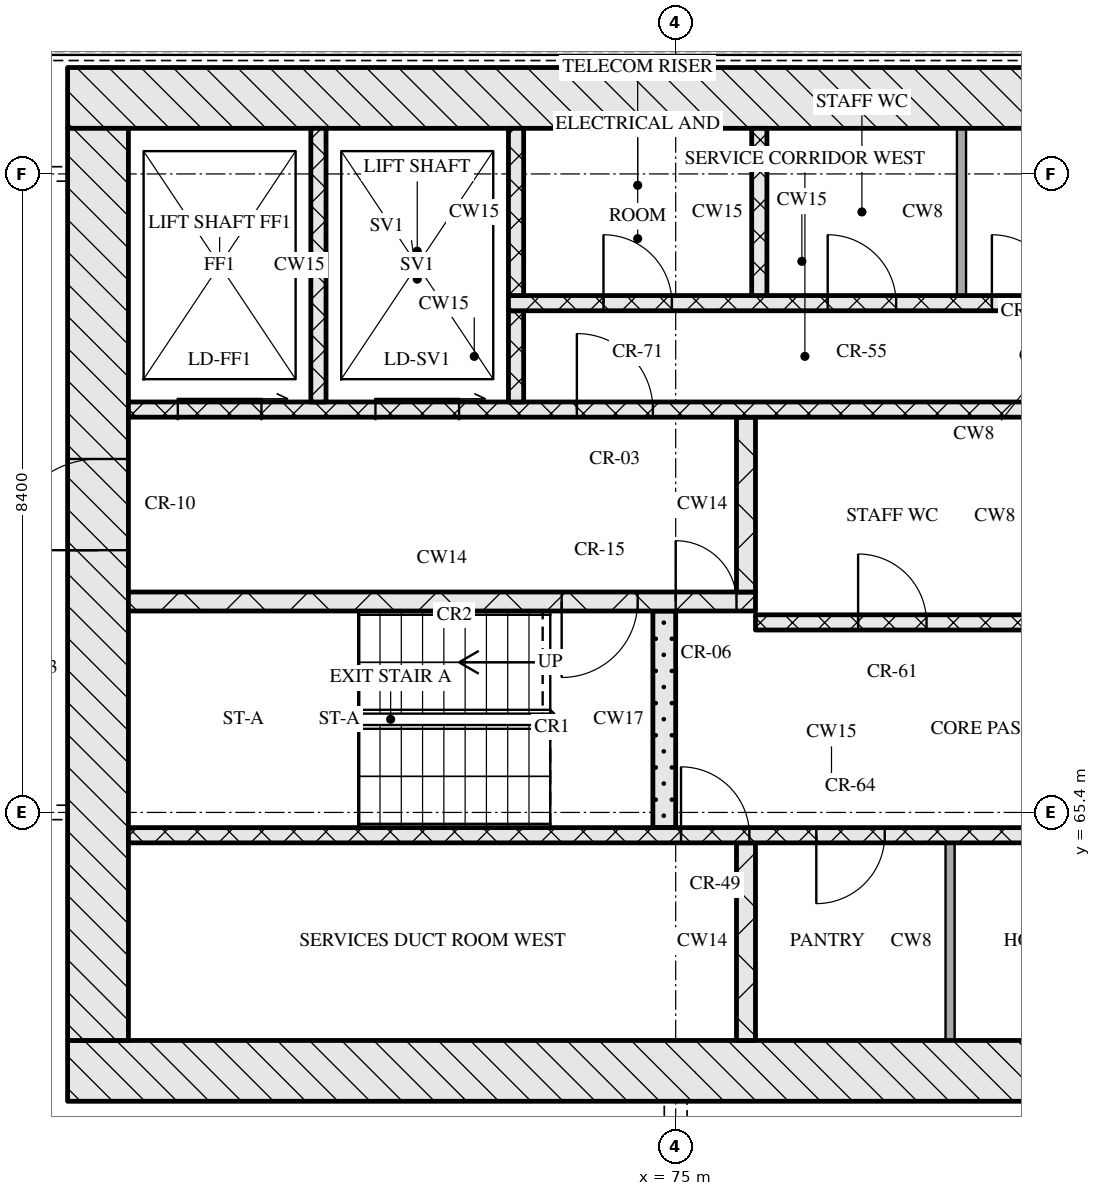
"""IFC4 building model, lengths in metres.
Left out: names, types, materials, properties, quantities, classifications, styles, units other than length and angle.
Written with IfcOpenShell. Run it as: python <this file> out.ifc"""

import sys

from ifc_helpers import new_model, si_unit, direction, frame, frame_2d, origin, place, context, subcontext, project, spatial, rectangle, extrude, element, fill, save


model = new_model("IFC4")
c1 = context("Model", 3, precision=1e-05, world=origin(), true_north=direction((0.0, 1.0)))
c2 = subcontext(c1, "Body", "Model", "MODEL_VIEW")
j1 = project(units=[si_unit("LENGTHUNIT", "METRE"), si_unit("PLANEANGLEUNIT", "RADIAN")], contexts=[c1])
p1 = place(None, origin())
s1 = spatial("IfcSite", under=j1, at=p1, CompositionType="ELEMENT")
p2 = place(p1, origin())
s2 = spatial("IfcBuilding", under=s1, at=p2, CompositionType="ELEMENT")
p3 = place(p2, frame((0.0, 0.0, 172.65)))
s3 = spatial("IfcBuildingStorey", under=s2, at=p3, CompositionType="ELEMENT", Elevation=172.65)
p4 = place(p3, frame((67.0, 62.0, 0.0), z_axis=(0.0, 0.0, 1.0), x_axis=(1.0, 0.0, 0.0)))
e1 = element("IfcWall", 1, at=p4, inside=s3, PredefinedType="SOLIDWALL", context=c2, shape_type="SweptSolid", body=[
    extrude(rectangle(XDim=41.2, YDim=0.8, at=frame_2d((20.6, 0.0))), origin(), (0.0, 0.0, 1.0), 3.32),
])
p5 = place(p4, frame((20.95, 0.0, 0.0)))
e2 = element("IfcOpeningElement", 2, at=p5, cuts=e1, PredefinedType="OPENING", context=c2, shape_type="SweptSolid", body=[
    extrude(rectangle(XDim=1.8, YDim=2.1, at=frame_2d((0.9, 1.05))), frame((0.0, 0.41, 0.0), z_axis=(0.0, -1.0, 0.0), x_axis=(1.0, 0.0, 0.0)), (0.0, 0.0, 1.0), 0.82),
])
p6 = place(p3, frame((67.0, 74.8, 0.0), z_axis=(0.0, 0.0, 1.0), x_axis=(1.0, 0.0, 0.0)))
e3 = element("IfcWall", 3, at=p6, inside=s3, PredefinedType="SOLIDWALL", context=c2, shape_type="SweptSolid", body=[
    extrude(rectangle(XDim=41.2, YDim=0.8, at=frame_2d((20.6, 0.0))), origin(), (0.0, 0.0, 1.0), 3.32),
])
p7 = place(p3, frame((67.4, 62.4, 0.0), z_axis=(0.0, 0.0, 1.0), x_axis=(0.0, 1.0, 0.0)))
e4 = element("IfcWall", 4, at=p7, inside=s3, PredefinedType="SOLIDWALL", context=c2, shape_type="SweptSolid", body=[
    extrude(rectangle(XDim=12.0, YDim=0.8, at=frame_2d((6.0, 0.0))), origin(), (0.0, 0.0, 1.0), 3.32),
])
p8 = place(p7, frame((6.45, 0.0, 0.0)))
e5 = element("IfcOpeningElement", 5, at=p8, cuts=e4, PredefinedType="OPENING", context=c2, shape_type="SweptSolid", body=[
    extrude(rectangle(XDim=1.2, YDim=2.1, at=frame_2d((0.6, 1.05))), frame((0.0, 0.41, 0.0), z_axis=(0.0, -1.0, 0.0), x_axis=(1.0, 0.0, 0.0)), (0.0, 0.0, 1.0), 0.82),
])
p9 = place(p3, frame((75.925, 62.4, 0.0), z_axis=(0.0, 0.0, 1.0), x_axis=(0.0, 1.0, 0.0)))
e6 = element("IfcWall", 6, at=p9, inside=s3, PredefinedType="SOLIDWALL", context=c2, shape_type="SweptSolid", body=[
    extrude(rectangle(XDim=2.6, YDim=0.25, at=frame_2d((1.3, 0.0))), origin(), (0.0, 0.0, 1.0), 3.32),
])
p10 = place(p3, frame((78.61, 62.4, 0.0), z_axis=(0.0, 0.0, 1.0), x_axis=(0.0, 1.0, 0.0)))
e7 = element("IfcWall", 7, at=p10, inside=s3, PredefinedType="PARTITIONING", context=c2, shape_type="SweptSolid", body=[
    extrude(rectangle(XDim=2.6, YDim=0.12, at=frame_2d((1.3, 0.0))), origin(), (0.0, 0.0, 1.0), 3.32),
])
p11 = place(p3, frame((67.8, 65.1, 0.0), z_axis=(0.0, 0.0, 1.0), x_axis=(1.0, 0.0, 0.0)))
e8 = element("IfcWall", 8, at=p11, inside=s3, PredefinedType="SOLIDWALL", context=c2, shape_type="SweptSolid", body=[
    extrude(rectangle(XDim=18.5, YDim=0.2, at=frame_2d((9.25, 0.0))), origin(), (0.0, 0.0, 1.0), 3.32),
])
p12 = place(p11, frame((7.27, 0.0, 0.0)))
e9 = element("IfcOpeningElement", 9, at=p12, cuts=e8, PredefinedType="OPENING", context=c2, shape_type="SweptSolid", body=[
    extrude(rectangle(XDim=0.9, YDim=2.1, at=frame_2d((0.45, 1.05))), frame((0.0, 0.11, 0.0), z_axis=(0.0, -1.0, 0.0), x_axis=(1.0, 0.0, 0.0)), (0.0, 0.0, 1.0), 0.22),
])
p13 = place(p11, frame((9.05, 0.0, 0.0)))
e10 = element("IfcOpeningElement", 10, at=p13, cuts=e8, PredefinedType="OPENING", context=c2, shape_type="SweptSolid", body=[
    extrude(rectangle(XDim=0.9, YDim=2.1, at=frame_2d((0.45, 1.05))), frame((0.0, 0.11, 0.0), z_axis=(0.0, -1.0, 0.0), x_axis=(1.0, 0.0, 0.0)), (0.0, 0.0, 1.0), 0.22),
])
p14 = place(p11, frame((12.76, 0.0, 0.0)))
e11 = element("IfcOpeningElement", 11, at=p14, cuts=e8, PredefinedType="OPENING", context=c2, shape_type="SweptSolid", body=[
    extrude(rectangle(XDim=0.9, YDim=2.1, at=frame_2d((0.45, 1.05))), frame((0.0, 0.11, 0.0), z_axis=(0.0, -1.0, 0.0), x_axis=(1.0, 0.0, 0.0)), (0.0, 0.0, 1.0), 0.22),
])
p15 = place(p11, frame((16.7, 0.0, 0.0)))
e12 = element("IfcOpeningElement", 12, at=p15, cuts=e8, PredefinedType="OPENING", context=c2, shape_type="SweptSolid", body=[
    extrude(rectangle(XDim=0.9, YDim=2.1, at=frame_2d((0.45, 1.05))), frame((0.0, 0.11, 0.0), z_axis=(0.0, -1.0, 0.0), x_axis=(1.0, 0.0, 0.0)), (0.0, 0.0, 1.0), 0.22),
])
p16 = place(p3, frame((74.85, 65.2, 0.0), z_axis=(0.0, 0.0, 1.0), x_axis=(0.0, 1.0, 0.0)))
e13 = element("IfcWall", 13, at=p16, inside=s3, PredefinedType="SOLIDWALL", context=c2, shape_type="SweptSolid", body=[
    extrude(rectangle(XDim=2.85, YDim=0.3, at=frame_2d((1.425, 0.0))), origin(), (0.0, 0.0, 1.0), 3.32),
])
p17 = place(p3, frame((76.05, 67.9, 0.0), z_axis=(0.0, 0.0, 1.0), x_axis=(1.0, 0.0, 0.0)))
e14 = element("IfcWall", 14, at=p17, inside=s3, PredefinedType="SOLIDWALL", context=c2, shape_type="SweptSolid", body=[
    extrude(rectangle(XDim=23.1, YDim=0.2, at=frame_2d((11.55, 0.0))), origin(), (0.0, 0.0, 1.0), 3.32),
])
p18 = place(p17, frame((1.35, 0.0, 0.0)))
e15 = element("IfcOpeningElement", 15, at=p18, cuts=e14, PredefinedType="OPENING", context=c2, shape_type="SweptSolid", body=[
    extrude(rectangle(XDim=0.9, YDim=2.1, at=frame_2d((0.45, 1.05))), frame((0.0, 0.11, 0.0), z_axis=(0.0, -1.0, 0.0), x_axis=(1.0, 0.0, 0.0)), (0.0, 0.0, 1.0), 0.22),
])
p19 = place(p17, frame((5.06, 0.0, 0.0)))
e16 = element("IfcOpeningElement", 16, at=p19, cuts=e14, PredefinedType="OPENING", context=c2, shape_type="SweptSolid", body=[
    extrude(rectangle(XDim=0.9, YDim=2.1, at=frame_2d((0.45, 1.05))), frame((0.0, 0.11, 0.0), z_axis=(0.0, -1.0, 0.0), x_axis=(1.0, 0.0, 0.0)), (0.0, 0.0, 1.0), 0.22),
])
p20 = place(p17, frame((8.45, 0.0, 0.0)))
e17 = element("IfcOpeningElement", 17, at=p20, cuts=e14, PredefinedType="OPENING", context=c2, shape_type="SweptSolid", body=[
    extrude(rectangle(XDim=0.9, YDim=2.1, at=frame_2d((0.45, 1.05))), frame((0.0, 0.11, 0.0), z_axis=(0.0, -1.0, 0.0), x_axis=(1.0, 0.0, 0.0)), (0.0, 0.0, 1.0), 0.22),
])
p21 = place(p17, frame((10.91, 0.0, 0.0)))
e18 = element("IfcOpeningElement", 18, at=p21, cuts=e14, PredefinedType="OPENING", context=c2, shape_type="SweptSolid", body=[
    extrude(rectangle(XDim=0.9, YDim=2.1, at=frame_2d((0.45, 1.05))), frame((0.0, 0.11, 0.0), z_axis=(0.0, -1.0, 0.0), x_axis=(1.0, 0.0, 0.0)), (0.0, 0.0, 1.0), 0.22),
])
p22 = place(p17, frame((13.55, 0.0, 0.0)))
e19 = element("IfcOpeningElement", 19, at=p22, cuts=e14, PredefinedType="OPENING", context=c2, shape_type="SweptSolid", body=[
    extrude(rectangle(XDim=1.0, YDim=2.1, at=frame_2d((0.5, 1.05))), frame((0.0, 0.11, 0.0), z_axis=(0.0, -1.0, 0.0), x_axis=(1.0, 0.0, 0.0)), (0.0, 0.0, 1.0), 0.22),
])
p23 = place(p17, frame((16.2, 0.0, 0.0)))
e20 = element("IfcOpeningElement", 20, at=p23, cuts=e14, PredefinedType="OPENING", context=c2, shape_type="SweptSolid", body=[
    extrude(rectangle(XDim=1.1, YDim=2.1, at=frame_2d((0.55, 1.05))), frame((0.0, 0.11, 0.0), z_axis=(0.0, -1.0, 0.0), x_axis=(1.0, 0.0, 0.0)), (0.0, 0.0, 1.0), 0.22),
])
p24 = place(p17, frame((18.7, 0.0, 0.0)))
e21 = element("IfcOpeningElement", 21, at=p24, cuts=e14, PredefinedType="OPENING", context=c2, shape_type="SweptSolid", body=[
    extrude(rectangle(XDim=1.1, YDim=2.1, at=frame_2d((0.55, 1.05))), frame((0.0, 0.11, 0.0), z_axis=(0.0, -1.0, 0.0), x_axis=(1.0, 0.0, 0.0)), (0.0, 0.0, 1.0), 0.22),
])
p25 = place(p17, frame((21.2, 0.0, 0.0)))
e22 = element("IfcOpeningElement", 22, at=p25, cuts=e14, PredefinedType="OPENING", context=c2, shape_type="SweptSolid", body=[
    extrude(rectangle(XDim=1.1, YDim=2.1, at=frame_2d((0.55, 1.05))), frame((0.0, 0.11, 0.0), z_axis=(0.0, -1.0, 0.0), x_axis=(1.0, 0.0, 0.0)), (0.0, 0.0, 1.0), 0.22),
])
p26 = place(p3, frame((67.8, 68.175, 0.0), z_axis=(0.0, 0.0, 1.0), x_axis=(1.0, 0.0, 0.0)))
e23 = element("IfcWall", 23, at=p26, inside=s3, PredefinedType="SOLIDWALL", context=c2, shape_type="SweptSolid", body=[
    extrude(rectangle(XDim=8.25, YDim=0.25, at=frame_2d((4.125, 0.0))), origin(), (0.0, 0.0, 1.0), 3.32),
])
p27 = place(p26, frame((5.7, 0.0, 0.0)))
e24 = element("IfcOpeningElement", 24, at=p27, cuts=e23, PredefinedType="OPENING", context=c2, shape_type="SweptSolid", body=[
    extrude(rectangle(XDim=1.0, YDim=2.1, at=frame_2d((0.5, 1.05))), frame((0.0, 0.135, 0.0), z_axis=(0.0, -1.0, 0.0), x_axis=(1.0, 0.0, 0.0)), (0.0, 0.0, 1.0), 0.27),
])
p28 = place(p26, frame((7.2, 0.0, 0.0)))
e25 = element("IfcOpeningElement", 25, at=p28, cuts=e23, PredefinedType="OPENING", context=c2, shape_type="SweptSolid", body=[
    extrude(rectangle(XDim=0.8, YDim=2.1, at=frame_2d((0.4, 1.05))), frame((0.0, 0.135, 0.0), z_axis=(0.0, -1.0, 0.0), x_axis=(1.0, 0.0, 0.0)), (0.0, 0.0, 1.0), 0.27),
])
p29 = place(p3, frame((75.925, 68.3, 0.0), z_axis=(0.0, 0.0, 1.0), x_axis=(0.0, 1.0, 0.0)))
e26 = element("IfcWall", 26, at=p29, inside=s3, PredefinedType="SOLIDWALL", context=c2, shape_type="SweptSolid", body=[
    extrude(rectangle(XDim=2.3, YDim=0.25, at=frame_2d((1.15, 0.0))), origin(), (0.0, 0.0, 1.0), 3.32),
])
p30 = place(p3, frame((67.8, 70.7, 0.0), z_axis=(0.0, 0.0, 1.0), x_axis=(1.0, 0.0, 0.0)))
e27 = element("IfcWall", 27, at=p30, inside=s3, PredefinedType="SOLIDWALL", context=c2, shape_type="SweptSolid", body=[
    extrude(rectangle(XDim=39.6, YDim=0.2, at=frame_2d((19.8, 0.0))), origin(), (0.0, 0.0, 1.0), 3.32),
])
p31 = place(p30, frame((0.65, 0.0, 0.0)))
e28 = element("IfcOpeningElement", 28, at=p31, cuts=e27, PredefinedType="OPENING", context=c2, shape_type="SweptSolid", body=[
    extrude(rectangle(XDim=1.1, YDim=2.1, at=frame_2d((0.55, 1.05))), frame((0.0, 0.11, 0.0), z_axis=(0.0, -1.0, 0.0), x_axis=(1.0, 0.0, 0.0)), (0.0, 0.0, 1.0), 0.22),
])
p32 = place(p30, frame((3.25, 0.0, 0.0)))
e29 = element("IfcOpeningElement", 29, at=p32, cuts=e27, PredefinedType="OPENING", context=c2, shape_type="SweptSolid", body=[
    extrude(rectangle(XDim=1.1, YDim=2.1, at=frame_2d((0.55, 1.05))), frame((0.0, 0.11, 0.0), z_axis=(0.0, -1.0, 0.0), x_axis=(1.0, 0.0, 0.0)), (0.0, 0.0, 1.0), 0.22),
])
p33 = place(p30, frame((5.9, 0.0, 0.0)))
e30 = element("IfcOpeningElement", 30, at=p33, cuts=e27, PredefinedType="OPENING", context=c2, shape_type="SweptSolid", body=[
    extrude(rectangle(XDim=1.0, YDim=2.1, at=frame_2d((0.5, 1.05))), frame((0.0, 0.11, 0.0), z_axis=(0.0, -1.0, 0.0), x_axis=(1.0, 0.0, 0.0)), (0.0, 0.0, 1.0), 0.22),
])
p34 = place(p30, frame((21.7, 0.0, 0.0)))
e31 = element("IfcOpeningElement", 31, at=p34, cuts=e27, PredefinedType="OPENING", context=c2, shape_type="SweptSolid", body=[
    extrude(rectangle(XDim=1.0, YDim=2.1, at=frame_2d((0.5, 1.05))), frame((0.0, 0.11, 0.0), z_axis=(0.0, -1.0, 0.0), x_axis=(1.0, 0.0, 0.0)), (0.0, 0.0, 1.0), 0.22),
])
p35 = place(p30, frame((32.7, 0.0, 0.0)))
e32 = element("IfcOpeningElement", 32, at=p35, cuts=e27, PredefinedType="OPENING", context=c2, shape_type="SweptSolid", body=[
    extrude(rectangle(XDim=1.0, YDim=2.1, at=frame_2d((0.5, 1.05))), frame((0.0, 0.11, 0.0), z_axis=(0.0, -1.0, 0.0), x_axis=(1.0, 0.0, 0.0)), (0.0, 0.0, 1.0), 0.22),
])
p36 = place(p30, frame((35.25, 0.0, 0.0)))
e33 = element("IfcOpeningElement", 33, at=p36, cuts=e27, PredefinedType="OPENING", context=c2, shape_type="SweptSolid", body=[
    extrude(rectangle(XDim=1.1, YDim=2.1, at=frame_2d((0.55, 1.05))), frame((0.0, 0.11, 0.0), z_axis=(0.0, -1.0, 0.0), x_axis=(1.0, 0.0, 0.0)), (0.0, 0.0, 1.0), 0.22),
])
p37 = place(p30, frame((37.85, 0.0, 0.0)))
e34 = element("IfcOpeningElement", 34, at=p37, cuts=e27, PredefinedType="OPENING", context=c2, shape_type="SweptSolid", body=[
    extrude(rectangle(XDim=1.1, YDim=2.1, at=frame_2d((0.55, 1.05))), frame((0.0, 0.11, 0.0), z_axis=(0.0, -1.0, 0.0), x_axis=(1.0, 0.0, 0.0)), (0.0, 0.0, 1.0), 0.22),
])
p38 = place(p3, frame((70.3, 70.8, 0.0), z_axis=(0.0, 0.0, 1.0), x_axis=(0.0, 1.0, 0.0)))
e35 = element("IfcWall", 35, at=p38, inside=s3, PredefinedType="SOLIDWALL", context=c2, shape_type="SweptSolid", body=[
    extrude(rectangle(XDim=3.6, YDim=0.2, at=frame_2d((1.8, 0.0))), origin(), (0.0, 0.0, 1.0), 3.32),
])
p39 = place(p3, frame((72.9, 70.8, 0.0), z_axis=(0.0, 0.0, 1.0), x_axis=(0.0, 1.0, 0.0)))
e36 = element("IfcWall", 36, at=p39, inside=s3, PredefinedType="SOLIDWALL", context=c2, shape_type="SweptSolid", body=[
    extrude(rectangle(XDim=1.2, YDim=0.2, at=frame_2d((0.6, 0.0))), origin(), (0.0, 0.0, 1.0), 3.32),
])
p40 = place(p3, frame((72.8, 72.1, 0.0), z_axis=(0.0, 0.0, 1.0), x_axis=(1.0, 0.0, 0.0)))
e37 = element("IfcWall", 37, at=p40, inside=s3, PredefinedType="SOLIDWALL", context=c2, shape_type="SweptSolid", body=[
    extrude(rectangle(XDim=7.72, YDim=0.2, at=frame_2d((3.86, 0.0))), origin(), (0.0, 0.0, 1.0), 3.32),
])
p41 = place(p40, frame((1.25, 0.0, 0.0)))
e38 = element("IfcOpeningElement", 38, at=p41, cuts=e37, PredefinedType="OPENING", context=c2, shape_type="SweptSolid", body=[
    extrude(rectangle(XDim=0.9, YDim=2.1, at=frame_2d((0.45, 1.05))), frame((0.0, 0.11, 0.0), z_axis=(0.0, -1.0, 0.0), x_axis=(1.0, 0.0, 0.0)), (0.0, 0.0, 1.0), 0.22),
])
p42 = place(p40, frame((4.2, 0.0, 0.0)))
e39 = element("IfcOpeningElement", 39, at=p42, cuts=e37, PredefinedType="OPENING", context=c2, shape_type="SweptSolid", body=[
    extrude(rectangle(XDim=0.9, YDim=2.1, at=frame_2d((0.45, 1.05))), frame((0.0, 0.11, 0.0), z_axis=(0.0, -1.0, 0.0), x_axis=(1.0, 0.0, 0.0)), (0.0, 0.0, 1.0), 0.22),
])
p43 = place(p40, frame((6.36, 0.0, 0.0)))
e40 = element("IfcOpeningElement", 40, at=p43, cuts=e37, PredefinedType="OPENING", context=c2, shape_type="SweptSolid", body=[
    extrude(rectangle(XDim=0.9, YDim=2.1, at=frame_2d((0.45, 1.05))), frame((0.0, 0.11, 0.0), z_axis=(0.0, -1.0, 0.0), x_axis=(1.0, 0.0, 0.0)), (0.0, 0.0, 1.0), 0.22),
])
for number, where, z_axis, x_axis in (
    (41, (72.9, 72.2, 0.0), (0.0, 0.0, 1.0), (0.0, 1.0, 0.0)),
    (42, (76.1, 72.2, 0.0), (0.0, 0.0, 1.0), (0.0, 1.0, 0.0)),
):
    element("IfcWall", number, at=place(p3, frame(where, z_axis=z_axis, x_axis=x_axis)), inside=s3, PredefinedType="SOLIDWALL", context=c2, shape_type="SweptSolid", body=[
        extrude(rectangle(XDim=2.2, YDim=0.2, at=frame_2d((1.1, 0.0))), origin(), (0.0, 0.0, 1.0), 3.32),
    ])
p44 = place(p3, frame((78.76, 72.2, 0.0), z_axis=(0.0, 0.0, 1.0), x_axis=(0.0, 1.0, 0.0)))
e43 = element("IfcWall", 43, at=p44, inside=s3, PredefinedType="PARTITIONING", context=c2, shape_type="SweptSolid", body=[
    extrude(rectangle(XDim=2.2, YDim=0.12, at=frame_2d((1.1, 0.0))), origin(), (0.0, 0.0, 1.0), 3.32),
])
p45 = place(p12, origin())
e44 = element("IfcDoor", 44, at=p45, inside=s3, OperationType="SINGLE_SWING_LEFT", PredefinedType="DOOR", context=c2, shape_type="SweptSolid", body=[
    extrude(rectangle(XDim=0.9, YDim=2.1, at=frame_2d((0.45, 1.05))), frame((0.0, 0.025, 0.0), z_axis=(0.0, -1.0, 0.0), x_axis=(1.0, 0.0, 0.0)), (0.0, 0.0, 1.0), 0.05),
])
fill(e9, e44)
p46 = place(p13, origin())
e45 = element("IfcDoor", 45, at=p46, inside=s3, OperationType="SINGLE_SWING_RIGHT", PredefinedType="DOOR", context=c2, shape_type="SweptSolid", body=[
    extrude(rectangle(XDim=0.9, YDim=2.1, at=frame_2d((0.45, 1.05))), frame((0.0, 0.025, 0.0), z_axis=(0.0, -1.0, 0.0), x_axis=(1.0, 0.0, 0.0)), (0.0, 0.0, 1.0), 0.05),
])
fill(e10, e45)
p47 = place(p18, origin())
e46 = element("IfcDoor", 46, at=p47, inside=s3, OperationType="SINGLE_SWING_LEFT", PredefinedType="DOOR", context=c2, shape_type="SweptSolid", body=[
    extrude(rectangle(XDim=0.9, YDim=2.1, at=frame_2d((0.45, 1.05))), frame((0.0, 0.025, 0.0), z_axis=(0.0, -1.0, 0.0), x_axis=(1.0, 0.0, 0.0)), (0.0, 0.0, 1.0), 0.05),
])
fill(e15, e46)
p48 = place(p27, origin())
e47 = element("IfcDoor", 47, at=p48, inside=s3, OperationType="SINGLE_SWING_RIGHT", PredefinedType="DOOR", context=c2, shape_type="SweptSolid", body=[
    extrude(rectangle(XDim=1.0, YDim=2.1, at=frame_2d((0.5, 1.05))), frame((0.0, 0.025, 0.0), z_axis=(0.0, -1.0, 0.0), x_axis=(1.0, 0.0, 0.0)), (0.0, 0.0, 1.0), 0.05),
])
fill(e24, e47)
p49 = place(p28, origin())
e48 = element("IfcDoor", 48, at=p49, inside=s3, OperationType="SINGLE_SWING_LEFT", PredefinedType="DOOR", context=c2, shape_type="SweptSolid", body=[
    extrude(rectangle(XDim=0.8, YDim=2.1, at=frame_2d((0.4, 1.05))), frame((0.0, 0.025, 0.0), z_axis=(0.0, -1.0, 0.0), x_axis=(1.0, 0.0, 0.0)), (0.0, 0.0, 1.0), 0.05),
])
fill(e25, e48)
p50 = place(p8, origin())
e49 = element("IfcDoor", 49, at=p50, inside=s3, OperationType="SINGLE_SWING_LEFT", PredefinedType="DOOR", context=c2, shape_type="SweptSolid", body=[
    extrude(rectangle(XDim=1.2, YDim=2.1, at=frame_2d((0.6, 1.05))), frame((0.0, 0.025, 0.0), z_axis=(0.0, -1.0, 0.0), x_axis=(1.0, 0.0, 0.0)), (0.0, 0.0, 1.0), 0.05),
])
fill(e5, e49)
p51 = place(p31, origin())
e50 = element("IfcDoor", 50, at=p51, inside=s3, OperationType="SLIDING_TO_RIGHT", PredefinedType="DOOR", context=c2, shape_type="SweptSolid", body=[
    extrude(rectangle(XDim=1.1, YDim=2.1, at=frame_2d((0.55, 1.05))), frame((0.0, 0.025, 0.0), z_axis=(0.0, -1.0, 0.0), x_axis=(1.0, 0.0, 0.0)), (0.0, 0.0, 1.0), 0.05),
])
fill(e28, e50)
p52 = place(p32, origin())
e51 = element("IfcDoor", 51, at=p52, inside=s3, OperationType="SLIDING_TO_RIGHT", PredefinedType="DOOR", context=c2, shape_type="SweptSolid", body=[
    extrude(rectangle(XDim=1.1, YDim=2.1, at=frame_2d((0.55, 1.05))), frame((0.0, 0.025, 0.0), z_axis=(0.0, -1.0, 0.0), x_axis=(1.0, 0.0, 0.0)), (0.0, 0.0, 1.0), 0.05),
])
fill(e29, e51)
p53 = place(p33, origin())
e52 = element("IfcDoor", 52, at=p53, inside=s3, OperationType="SINGLE_SWING_LEFT", PredefinedType="DOOR", context=c2, shape_type="SweptSolid", body=[
    extrude(rectangle(XDim=1.0, YDim=2.1, at=frame_2d((0.5, 1.05))), frame((0.0, 0.025, 0.0), z_axis=(0.0, -1.0, 0.0), x_axis=(1.0, 0.0, 0.0)), (0.0, 0.0, 1.0), 0.05),
])
fill(e30, e52)
p54 = place(p41, origin())
e53 = element("IfcDoor", 53, at=p54, inside=s3, OperationType="SINGLE_SWING_LEFT", PredefinedType="DOOR", context=c2, shape_type="SweptSolid", body=[
    extrude(rectangle(XDim=0.9, YDim=2.1, at=frame_2d((0.45, 1.05))), frame((0.0, 0.025, 0.0), z_axis=(0.0, -1.0, 0.0), x_axis=(1.0, 0.0, 0.0)), (0.0, 0.0, 1.0), 0.05),
])
fill(e38, e53)
p55 = place(p42, origin())
e54 = element("IfcDoor", 54, at=p55, inside=s3, OperationType="SINGLE_SWING_LEFT", PredefinedType="DOOR", context=c2, shape_type="SweptSolid", body=[
    extrude(rectangle(XDim=0.9, YDim=2.1, at=frame_2d((0.45, 1.05))), frame((0.0, 0.025, 0.0), z_axis=(0.0, -1.0, 0.0), x_axis=(1.0, 0.0, 0.0)), (0.0, 0.0, 1.0), 0.05),
])
fill(e39, e54)
p56 = place(p43, origin())
e55 = element("IfcDoor", 55, at=p56, inside=s3, OperationType="SINGLE_SWING_LEFT", PredefinedType="DOOR", context=c2, shape_type="SweptSolid", body=[
    extrude(rectangle(XDim=0.9, YDim=2.1, at=frame_2d((0.45, 1.05))), frame((0.0, 0.025, 0.0), z_axis=(0.0, -1.0, 0.0), x_axis=(1.0, 0.0, 0.0)), (0.0, 0.0, 1.0), 0.05),
])
fill(e40, e55)
save(model, sys.argv[1])
